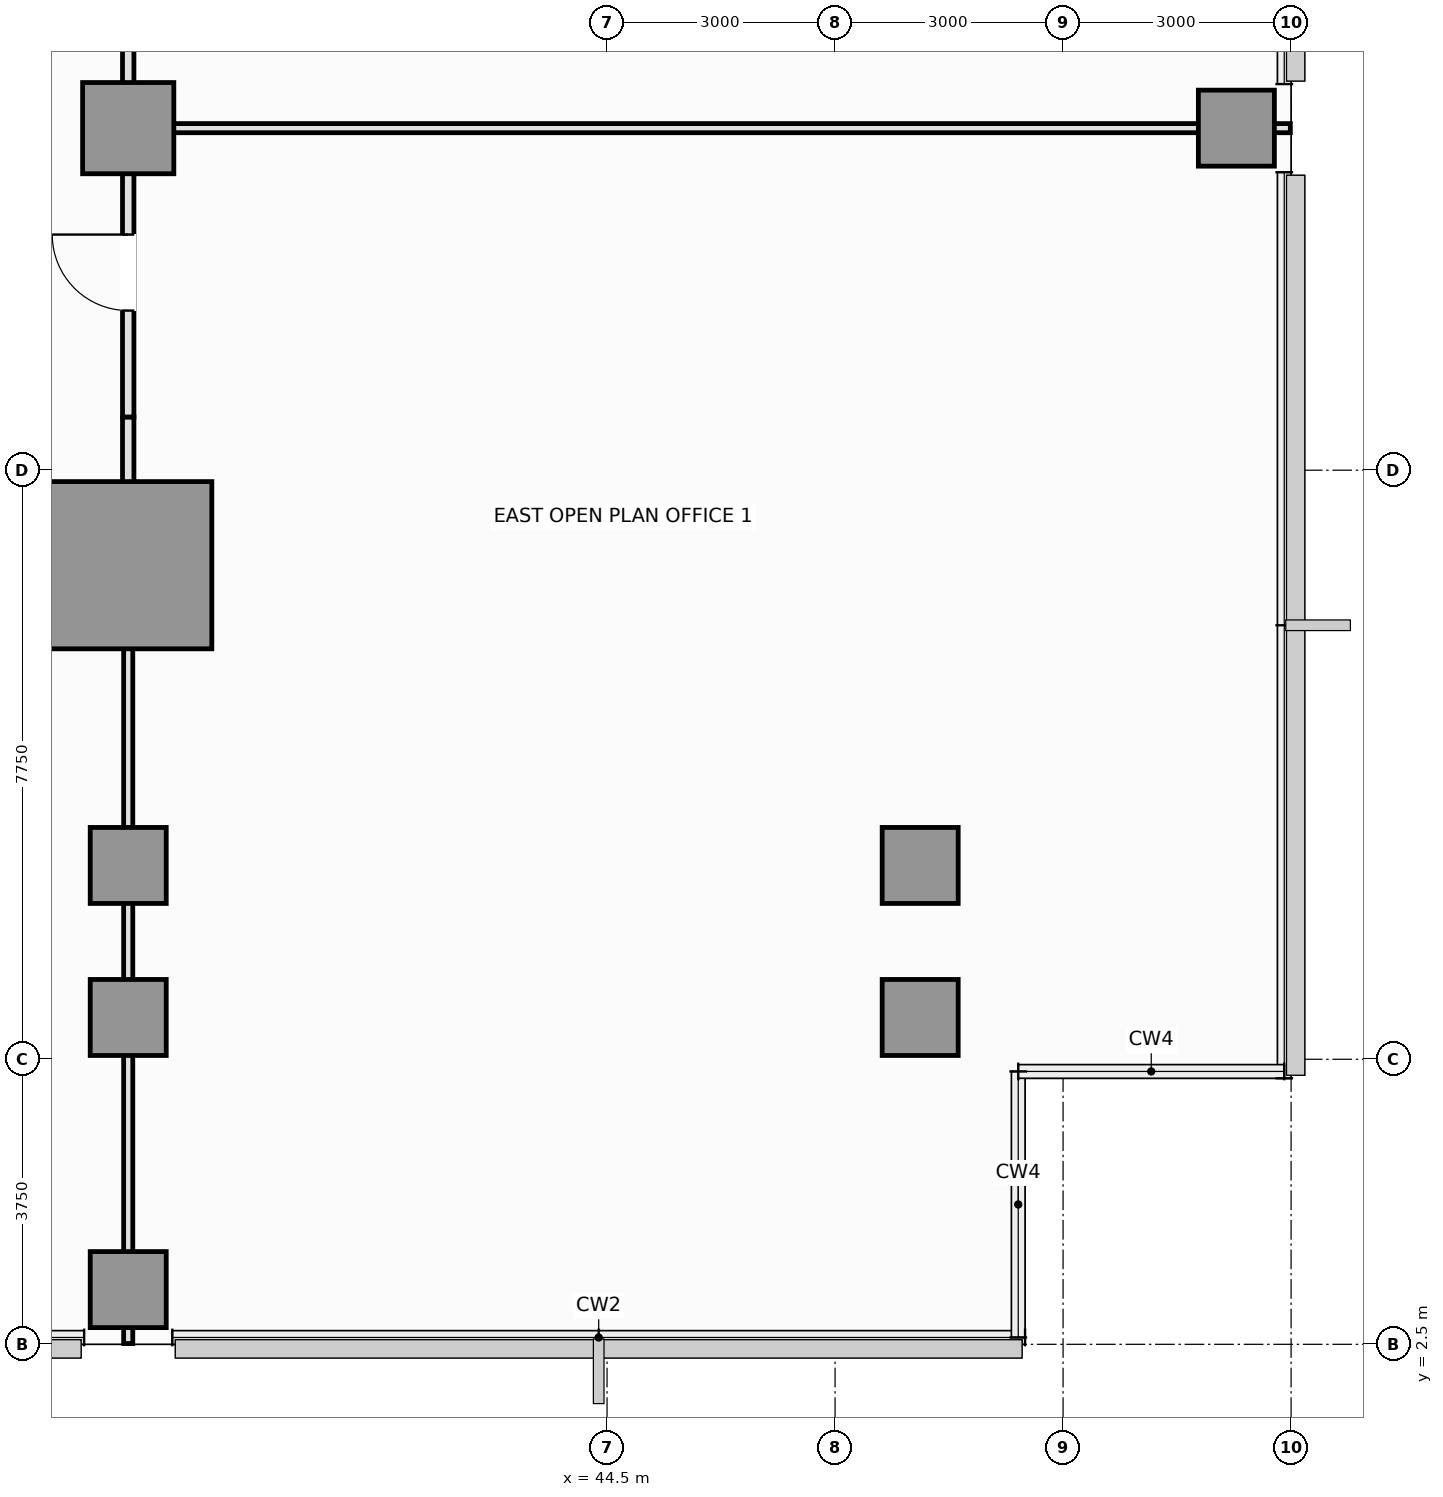
"""IFC4 building model, lengths in metres.
Left out: names, types, materials, properties, quantities, classifications, styles, units other than length and angle.
Written with IfcOpenShell. Run it as: python <this file> out.ifc"""

import sys

from ifc_helpers import new_model, si_unit, direction, frame, frame_2d, origin, origin_2d, place, context, subcontext, project, spatial, rectangle, extrude, element, fill, save


model = new_model("IFC4")
c1 = context("Model", 3, precision=1e-05, world=origin(), true_north=direction((0.0, 1.0)))
c2 = subcontext(c1, "Body", "Model", "MODEL_VIEW")
j1 = project(units=[si_unit("LENGTHUNIT", "METRE"), si_unit("PLANEANGLEUNIT", "RADIAN")], contexts=[c1])
p1 = place(None, origin())
s1 = spatial("IfcSite", under=j1, at=p1, CompositionType="ELEMENT")
p2 = place(p1, origin())
s2 = spatial("IfcBuilding", under=s1, at=p2, CompositionType="ELEMENT")
p3 = place(p2, frame((0.0, 0.0, 25.6)))
s3 = spatial("IfcBuildingStorey", under=s2, at=p3, CompositionType="ELEMENT", Elevation=25.6)
p4 = place(p3, frame((38.2, 12.75, 0.0), z_axis=(0.0, 0.0, 1.0), x_axis=(1.0, 0.0, 0.0)))
e1 = element("IfcColumn", 1, at=p4, inside=s3, PredefinedType="COLUMN", context=c2, shape_type="SweptSolid", body=[
    extrude(rectangle(XDim=2.2, YDim=2.2, at=origin_2d()), origin(), (0.0, 0.0, 1.0), 3.55),
])
p5 = place(p3, frame((38.2, 18.5, 0.0), z_axis=(0.0, 0.0, 1.0), x_axis=(1.0, 0.0, 0.0)))
e2 = element("IfcColumn", 2, at=p5, inside=s3, PredefinedType="COLUMN", context=c2, shape_type="SweptSolid", body=[
    extrude(rectangle(XDim=1.2, YDim=1.2, at=origin_2d()), origin(), (0.0, 0.0, 1.0), 3.55),
])
for number, where, z_axis, x_axis in (
    (3, (48.62, 6.8, 0.0), (0.0, 0.0, 1.0), (1.0, 0.0, 0.0)),
    (4, (38.2, 6.8, 0.0), (0.0, 0.0, 1.0), (1.0, 0.0, 0.0)),
    (5, (38.2, 8.8, 0.0), (0.0, 0.0, 1.0), (1.0, 0.0, 0.0)),
    (6, (48.62, 8.8, 0.0), (0.0, 0.0, 1.0), (1.0, 0.0, 0.0)),
    (7, (52.78, 18.5, 0.0), (0.0, 0.0, 1.0), (1.0, 0.0, 0.0)),
    (8, (38.2, 3.22, 0.0), (0.0, 0.0, 1.0), (1.0, 0.0, 0.0)),
):
    element("IfcColumn", number, at=place(p3, frame(where, z_axis=z_axis, x_axis=x_axis)), inside=s3, PredefinedType="COLUMN", context=c2, shape_type="SweptSolid", body=[
        extrude(rectangle(XDim=1.0, YDim=1.0, at=origin_2d()), origin(), (0.0, 0.0, 1.0), 3.55),
    ])
p6 = place(p3, frame((27.5, 12.8, 0.0), z_axis=(0.0, 0.0, 1.0), x_axis=(1.0, 0.0, 0.0)))
e9 = element("IfcWall", 9, at=p6, inside=s3, PredefinedType="PARTITIONING", context=c2, shape_type="SweptSolid", body=[
    extrude(rectangle(XDim=10.7, YDim=0.15, at=frame_2d((5.35, 0.0))), origin(), (0.0, 0.0, 1.0), 2.72),
])
p7 = place(p6, frame((4.85, 0.0, 0.0)))
e10 = element("IfcOpeningElement", 10, at=p7, cuts=e9, PredefinedType="OPENING", context=c2, shape_type="SweptSolid", body=[
    extrude(rectangle(XDim=1.0, YDim=2.15, at=frame_2d((0.5, 1.075))), frame((0.0, 0.085, 0.0), z_axis=(0.0, -1.0, 0.0), x_axis=(1.0, 0.0, 0.0)), (0.0, 0.0, 1.0), 0.17),
])
p8 = place(p3, frame((38.2, 12.8, 0.0), z_axis=(0.0, 0.0, 1.0), x_axis=(0.0, 1.0, 0.0)))
e11 = element("IfcWall", 11, at=p8, inside=s3, PredefinedType="PARTITIONING", context=c2, shape_type="SweptSolid", body=[
    extrude(rectangle(XDim=1.9, YDim=0.15, at=frame_2d((0.95, 0.0))), origin(), (0.0, 0.0, 1.0), 2.82),
])
p9 = place(p3, frame((38.2, 14.7, 0.0), z_axis=(0.0, 0.0, 1.0), x_axis=(0.0, 1.0, 0.0)))
e12 = element("IfcWall", 12, at=p9, inside=s3, PredefinedType="PARTITIONING", context=c2, shape_type="SweptSolid", body=[
    extrude(rectangle(XDim=3.8, YDim=0.15, at=frame_2d((1.9, 0.0))), origin(), (0.0, 0.0, 1.0), 2.82),
])
p10 = place(p9, frame((1.4, 0.0, 0.0)))
e13 = element("IfcOpeningElement", 13, at=p10, cuts=e12, PredefinedType="OPENING", context=c2, shape_type="SweptSolid", body=[
    extrude(rectangle(XDim=1.0, YDim=2.15, at=frame_2d((0.5, 1.075))), frame((0.0, 0.085, 0.0), z_axis=(0.0, -1.0, 0.0), x_axis=(1.0, 0.0, 0.0)), (0.0, 0.0, 1.0), 0.17),
])
p11 = place(p3, frame((38.2, 18.5, 0.0), z_axis=(0.0, 0.0, 1.0), x_axis=(0.0, 1.0, 0.0)))
e14 = element("IfcWall", 14, at=p11, inside=s3, PredefinedType="PARTITIONING", context=c2, shape_type="SweptSolid", body=[
    extrude(rectangle(XDim=6.75, YDim=0.15, at=frame_2d((3.375, 0.0))), origin(), (0.0, 0.0, 1.0), 2.82),
])
p12 = place(p11, frame((2.875, 0.0, 0.0)))
e15 = element("IfcOpeningElement", 15, at=p12, cuts=e14, PredefinedType="OPENING", context=c2, shape_type="SweptSolid", body=[
    extrude(rectangle(XDim=1.0, YDim=2.15, at=frame_2d((0.5, 1.075))), frame((0.0, 0.085, 0.0), z_axis=(0.0, -1.0, 0.0), x_axis=(1.0, 0.0, 0.0)), (0.0, 0.0, 1.0), 0.17),
])
p13 = place(p3, frame((38.2, 2.51, 0.0), z_axis=(0.0, 0.0, 1.0), x_axis=(0.0, 1.0, 0.0)))
e16 = element("IfcWall", 16, at=p13, inside=s3, PredefinedType="PARTITIONING", context=c2, shape_type="SweptSolid", body=[
    extrude(rectangle(XDim=10.29, YDim=0.12, at=frame_2d((5.145, 0.0))), origin(), (0.0, 0.0, 1.0), 2.82),
])
p14 = place(p3, frame((38.2, 18.5, 0.0), z_axis=(0.0, 0.0, 1.0), x_axis=(1.0, 0.0, 0.0)))
e17 = element("IfcWall", 17, at=p14, inside=s3, PredefinedType="PARTITIONING", context=c2, shape_type="SweptSolid", body=[
    extrude(rectangle(XDim=15.29, YDim=0.12, at=frame_2d((7.645, 0.0))), origin(), (0.0, 0.0, 1.0), 2.72),
])
p15 = place(p10, origin())
e18 = element("IfcDoor", 18, at=p15, inside=s3, OperationType="SINGLE_SWING_RIGHT", PredefinedType="DOOR", context=c2, shape_type="SweptSolid", body=[
    extrude(rectangle(XDim=1.0, YDim=2.15, at=frame_2d((0.5, 1.075))), frame((0.0, 0.025, 0.0), z_axis=(0.0, -1.0, 0.0), x_axis=(1.0, 0.0, 0.0)), (0.0, 0.0, 1.0), 0.05),
])
fill(e13, e18)
save(model, sys.argv[1])
